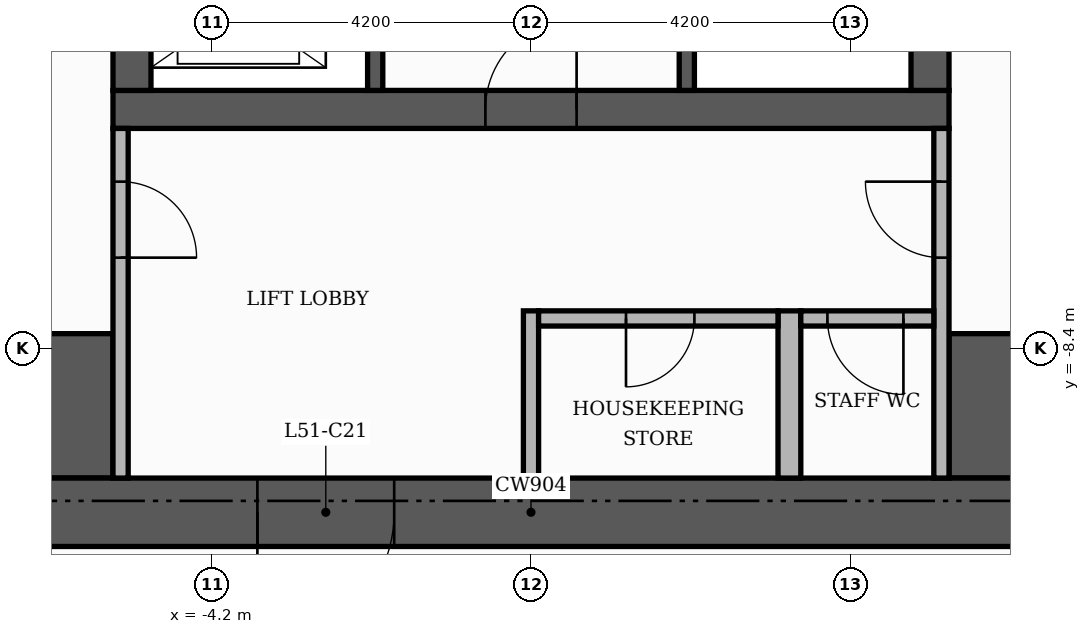
"""IFC4 building model, lengths in metres.
Left out: names, types, materials, properties, quantities, classifications, styles, units other than length and angle.
Written with IfcOpenShell. Run it as: python <this file> out.ifc"""

import sys

from ifc_helpers import new_model, si_unit, direction, frame, frame_2d, origin, place, context, subcontext, project, spatial, rectangle, extrude, element, fill, save


model = new_model("IFC4")
c1 = context("Model", 3, precision=1e-05, world=origin(), true_north=direction((0.0, 1.0)))
c2 = subcontext(c1, "Body", "Model", "MODEL_VIEW")
j1 = project(units=[si_unit("LENGTHUNIT", "METRE"), si_unit("PLANEANGLEUNIT", "RADIAN")], contexts=[c1])
p1 = place(None, origin())
s1 = spatial("IfcSite", under=j1, at=p1, CompositionType="ELEMENT")
p2 = place(p1, origin())
s2 = spatial("IfcBuilding", under=s1, at=p2, CompositionType="ELEMENT")
p3 = place(p2, frame((0.0, 0.0, 215.7)))
s3 = spatial("IfcBuildingStorey", under=s2, at=p3, CompositionType="ELEMENT", Elevation=215.7)
p4 = place(p3, frame((-5.5, -5.25, 0.0), z_axis=(0.0, 0.0, 1.0), x_axis=(1.0, 0.0, 0.0)))
e1 = element("IfcWall", 1, at=p4, inside=s3, PredefinedType="SHEAR", context=c2, shape_type="SweptSolid", body=[
    extrude(rectangle(XDim=11.0, YDim=0.5, at=frame_2d((5.5, 0.0))), origin(), (0.0, 0.0, 1.0), 3.48),
])
p5 = place(p4, frame((4.9, 0.0, 0.0)))
e2 = element("IfcOpeningElement", 2, at=p5, cuts=e1, PredefinedType="OPENING", context=c2, shape_type="SweptSolid", body=[
    extrude(rectangle(XDim=1.2, YDim=2.1, at=frame_2d((0.6, 1.05))), frame((0.0, 0.26, 0.0), z_axis=(0.0, -1.0, 0.0), x_axis=(1.0, 0.0, 0.0)), (0.0, 0.0, 1.0), 0.52),
])
for number, where, z_axis, x_axis in (
    (3, (-5.25, -5.0, 0.0), (0.0, 0.0, 1.0), (0.0, 1.0, 0.0)),
    (4, (5.25, -5.0, 0.0), (0.0, 0.0, 1.0), (0.0, 1.0, 0.0)),
):
    element("IfcWall", number, at=place(p3, frame(where, z_axis=z_axis, x_axis=x_axis)), inside=s3, PredefinedType="SHEAR", context=c2, shape_type="SweptSolid", body=[
        extrude(rectangle(XDim=10.5, YDim=0.5, at=frame_2d((5.25, 0.0))), origin(), (0.0, 0.0, 1.0), 3.48),
    ])
for number, where, z_axis, x_axis in (
    (5, (-10.1, -9.15, 0.0), (0.0, 0.0, 1.0), (1.0, 0.0, 0.0)),
    (6, (5.5, -9.15, 0.0), (0.0, 0.0, 1.0), (1.0, 0.0, 0.0)),
):
    element("IfcWall", number, at=place(p3, frame(where, z_axis=z_axis, x_axis=x_axis)), inside=s3, PredefinedType="SHEAR", context=c2, shape_type="SweptSolid", body=[
        extrude(rectangle(XDim=4.6, YDim=1.9, at=frame_2d((2.3, 0.0))), origin(), (0.0, 0.0, 1.0), 3.48),
    ])
p6 = place(p3, frame((2.05, -5.0, 0.0), z_axis=(0.0, 0.0, 1.0), x_axis=(0.0, 1.0, 0.0)))
e7 = element("IfcWall", 7, at=p6, inside=s3, PredefinedType="SHEAR", context=c2, shape_type="SweptSolid", body=[
    extrude(rectangle(XDim=6.6, YDim=0.2, at=frame_2d((3.3, 0.0))), origin(), (0.0, 0.0, 1.0), 3.48),
])
p7 = place(p6, frame((5.25, 0.0, 0.0)))
e8 = element("IfcOpeningElement", 8, at=p7, cuts=e7, PredefinedType="OPENING", context=c2, shape_type="SweptSolid", body=[
    extrude(rectangle(XDim=1.0, YDim=2.1, at=frame_2d((0.5, 1.05))), frame((0.0, 0.11, 0.0), z_axis=(0.0, -1.0, 0.0), x_axis=(1.0, 0.0, 0.0)), (0.0, 0.0, 1.0), 0.22),
])
p8 = place(p3, frame((-2.05, -5.0, 0.0), z_axis=(0.0, 0.0, 1.0), x_axis=(0.0, 1.0, 0.0)))
e9 = element("IfcWall", 9, at=p8, inside=s3, PredefinedType="SHEAR", context=c2, shape_type="SweptSolid", body=[
    extrude(rectangle(XDim=3.4, YDim=0.2, at=frame_2d((1.7, 0.0))), origin(), (0.0, 0.0, 1.0), 3.48),
])
p9 = place(p8, frame((0.55, 0.0, 0.0)))
e10 = element("IfcOpeningElement", 10, at=p9, cuts=e9, PredefinedType="OPENING", context=c2, shape_type="SweptSolid", body=[
    extrude(rectangle(XDim=1.1, YDim=2.1, at=frame_2d((0.55, 1.05))), frame((0.0, 0.11, 0.0), z_axis=(0.0, -1.0, 0.0), x_axis=(1.0, 0.0, 0.0)), (0.0, 0.0, 1.0), 0.22),
])
p10 = place(p8, frame((2.45, 0.0, 0.0)))
e11 = element("IfcOpeningElement", 11, at=p10, cuts=e9, PredefinedType="OPENING", context=c2, shape_type="SweptSolid", body=[
    extrude(rectangle(XDim=0.8, YDim=2.1, at=frame_2d((0.4, 1.05))), frame((0.0, 0.11, 0.0), z_axis=(0.0, -1.0, 0.0), x_axis=(1.0, 0.0, 0.0)), (0.0, 0.0, 1.0), 0.22),
])
p11 = place(p3, frame((-11.0, -10.55, 0.0), z_axis=(0.0, 0.0, 1.0), x_axis=(1.0, 0.0, 0.0)))
e12 = element("IfcWall", 12, at=p11, inside=s3, PredefinedType="SHEAR", context=c2, shape_type="SweptSolid", body=[
    extrude(rectangle(XDim=22.0, YDim=0.9, at=frame_2d((11.0, 0.0))), origin(), (0.0, 0.0, 1.0), 3.48),
])
p12 = place(p11, frame((7.4, 0.0, 0.0)))
e13 = element("IfcOpeningElement", 13, at=p12, cuts=e12, PredefinedType="OPENING", context=c2, shape_type="SweptSolid", body=[
    extrude(rectangle(XDim=1.8, YDim=2.2, at=frame_2d((0.9, 1.1))), frame((0.0, 0.46, 0.0), z_axis=(0.0, -1.0, 0.0), x_axis=(1.0, 0.0, 0.0)), (0.0, 0.0, 1.0), 0.92),
])
p13 = place(p3, frame((-5.4, -10.1, 0.0), z_axis=(0.0, 0.0, 1.0), x_axis=(0.0, 1.0, 0.0)))
e14 = element("IfcWall", 14, at=p13, inside=s3, PredefinedType="PARTITIONING", context=c2, shape_type="SweptSolid", body=[
    extrude(rectangle(XDim=4.6, YDim=0.2, at=frame_2d((2.3, 0.0))), origin(), (0.0, 0.0, 1.0), 3.48),
])
p14 = place(p13, frame((2.9, 0.0, 0.0)))
e15 = element("IfcOpeningElement", 15, at=p14, cuts=e14, PredefinedType="OPENING", context=c2, shape_type="SweptSolid", body=[
    extrude(rectangle(XDim=1.0, YDim=2.1, at=frame_2d((0.5, 1.05))), frame((0.0, 0.11, 0.0), z_axis=(0.0, -1.0, 0.0), x_axis=(1.0, 0.0, 0.0)), (0.0, 0.0, 1.0), 0.22),
])
p15 = place(p3, frame((0.0, -10.1, 0.0), z_axis=(0.0, 0.0, 1.0), x_axis=(0.0, 1.0, 0.0)))
e16 = element("IfcWall", 16, at=p15, inside=s3, PredefinedType="PARTITIONING", context=c2, shape_type="SweptSolid", body=[
    extrude(rectangle(XDim=2.2, YDim=0.2, at=frame_2d((1.1, 0.0))), origin(), (0.0, 0.0, 1.0), 3.48),
])
p16 = place(p3, frame((3.4, -10.1, 0.0), z_axis=(0.0, 0.0, 1.0), x_axis=(0.0, 1.0, 0.0)))
e17 = element("IfcWall", 17, at=p16, inside=s3, PredefinedType="PARTITIONING", context=c2, shape_type="SweptSolid", body=[
    extrude(rectangle(XDim=2.2, YDim=0.3, at=frame_2d((1.1, 0.0))), origin(), (0.0, 0.0, 1.0), 3.48),
])
p17 = place(p3, frame((5.4, -10.1, 0.0), z_axis=(0.0, 0.0, 1.0), x_axis=(0.0, 1.0, 0.0)))
e18 = element("IfcWall", 18, at=p17, inside=s3, PredefinedType="PARTITIONING", context=c2, shape_type="SweptSolid", body=[
    extrude(rectangle(XDim=4.6, YDim=0.2, at=frame_2d((2.3, 0.0))), origin(), (0.0, 0.0, 1.0), 3.48),
])
p18 = place(p17, frame((2.9, 0.0, 0.0)))
e19 = element("IfcOpeningElement", 19, at=p18, cuts=e18, PredefinedType="OPENING", context=c2, shape_type="SweptSolid", body=[
    extrude(rectangle(XDim=1.0, YDim=2.1, at=frame_2d((0.5, 1.05))), frame((0.0, 0.11, 0.0), z_axis=(0.0, -1.0, 0.0), x_axis=(1.0, 0.0, 0.0)), (0.0, 0.0, 1.0), 0.22),
])
p19 = place(p3, frame((0.1, -8.0, 0.0), z_axis=(0.0, 0.0, 1.0), x_axis=(1.0, 0.0, 0.0)))
e20 = element("IfcWall", 20, at=p19, inside=s3, PredefinedType="PARTITIONING", context=c2, shape_type="SweptSolid", body=[
    extrude(rectangle(XDim=3.15, YDim=0.2, at=frame_2d((1.575, 0.0))), origin(), (0.0, 0.0, 1.0), 3.48),
])
p20 = place(p19, frame((1.15, 0.0, 0.0)))
e21 = element("IfcOpeningElement", 21, at=p20, cuts=e20, PredefinedType="OPENING", context=c2, shape_type="SweptSolid", body=[
    extrude(rectangle(XDim=0.9, YDim=2.1, at=frame_2d((0.45, 1.05))), frame((0.0, 0.11, 0.0), z_axis=(0.0, -1.0, 0.0), x_axis=(1.0, 0.0, 0.0)), (0.0, 0.0, 1.0), 0.22),
])
p21 = place(p3, frame((3.55, -8.0, 0.0), z_axis=(0.0, 0.0, 1.0), x_axis=(1.0, 0.0, 0.0)))
e22 = element("IfcWall", 22, at=p21, inside=s3, PredefinedType="PARTITIONING", context=c2, shape_type="SweptSolid", body=[
    extrude(rectangle(XDim=1.75, YDim=0.2, at=frame_2d((0.875, 0.0))), origin(), (0.0, 0.0, 1.0), 3.48),
])
p22 = place(p21, frame((0.35, 0.0, 0.0)))
e23 = element("IfcOpeningElement", 23, at=p22, cuts=e22, PredefinedType="OPENING", context=c2, shape_type="SweptSolid", body=[
    extrude(rectangle(XDim=1.0, YDim=2.1, at=frame_2d((0.5, 1.05))), frame((0.0, 0.11, 0.0), z_axis=(0.0, -1.0, 0.0), x_axis=(1.0, 0.0, 0.0)), (0.0, 0.0, 1.0), 0.22),
])
p23 = place(p5, origin())
e24 = element("IfcDoor", 24, at=p23, inside=s3, OperationType="SINGLE_SWING_RIGHT", PredefinedType="DOOR", context=c2, shape_type="SweptSolid", body=[
    extrude(rectangle(XDim=1.2, YDim=2.1, at=frame_2d((0.6, 1.05))), frame((0.0, 0.025, 0.0), z_axis=(0.0, -1.0, 0.0), x_axis=(1.0, 0.0, 0.0)), (0.0, 0.0, 1.0), 0.05),
])
fill(e2, e24)
p24 = place(p14, frame((1.0, 0.0, 0.0), z_axis=(0.0, 0.0, 1.0), x_axis=(-1.0, 0.0, 0.0)))
e25 = element("IfcDoor", 25, at=p24, inside=s3, OperationType="SINGLE_SWING_LEFT", PredefinedType="DOOR", context=c2, shape_type="SweptSolid", body=[
    extrude(rectangle(XDim=1.0, YDim=2.1, at=frame_2d((0.5, 1.05))), frame((0.0, 0.025, 0.0), z_axis=(0.0, -1.0, 0.0), x_axis=(1.0, 0.0, 0.0)), (0.0, 0.0, 1.0), 0.05),
])
fill(e15, e25)
p25 = place(p18, origin())
e26 = element("IfcDoor", 26, at=p25, inside=s3, OperationType="SINGLE_SWING_RIGHT", PredefinedType="DOOR", context=c2, shape_type="SweptSolid", body=[
    extrude(rectangle(XDim=1.0, YDim=2.1, at=frame_2d((0.5, 1.05))), frame((0.0, 0.025, 0.0), z_axis=(0.0, -1.0, 0.0), x_axis=(1.0, 0.0, 0.0)), (0.0, 0.0, 1.0), 0.05),
])
fill(e19, e26)
p26 = place(p12, frame((1.8, 0.0, 0.0), z_axis=(0.0, 0.0, 1.0), x_axis=(-1.0, 0.0, 0.0)))
e27 = element("IfcDoor", 27, at=p26, inside=s3, OperationType="DOUBLE_DOOR_SINGLE_SWING", PredefinedType="DOOR", context=c2, shape_type="SweptSolid", body=[
    extrude(rectangle(XDim=1.8, YDim=2.2, at=frame_2d((0.9, 1.1))), frame((0.0, 0.025, 0.0), z_axis=(0.0, -1.0, 0.0), x_axis=(1.0, 0.0, 0.0)), (0.0, 0.0, 1.0), 0.05),
])
fill(e13, e27)
p27 = place(p20, frame((0.9, 0.0, 0.0), z_axis=(0.0, 0.0, 1.0), x_axis=(-1.0, 0.0, 0.0)))
e28 = element("IfcDoor", 28, at=p27, inside=s3, OperationType="SINGLE_SWING_LEFT", PredefinedType="DOOR", context=c2, shape_type="SweptSolid", body=[
    extrude(rectangle(XDim=0.9, YDim=2.1, at=frame_2d((0.45, 1.05))), frame((0.0, 0.025, 0.0), z_axis=(0.0, -1.0, 0.0), x_axis=(1.0, 0.0, 0.0)), (0.0, 0.0, 1.0), 0.05),
])
fill(e21, e28)
p28 = place(p22, frame((1.0, 0.0, 0.0), z_axis=(0.0, 0.0, 1.0), x_axis=(-1.0, 0.0, 0.0)))
e29 = element("IfcDoor", 29, at=p28, inside=s3, OperationType="SINGLE_SWING_RIGHT", PredefinedType="DOOR", context=c2, shape_type="SweptSolid", body=[
    extrude(rectangle(XDim=1.0, YDim=2.1, at=frame_2d((0.5, 1.05))), frame((0.0, 0.025, 0.0), z_axis=(0.0, -1.0, 0.0), x_axis=(1.0, 0.0, 0.0)), (0.0, 0.0, 1.0), 0.05),
])
fill(e23, e29)
save(model, sys.argv[1])
